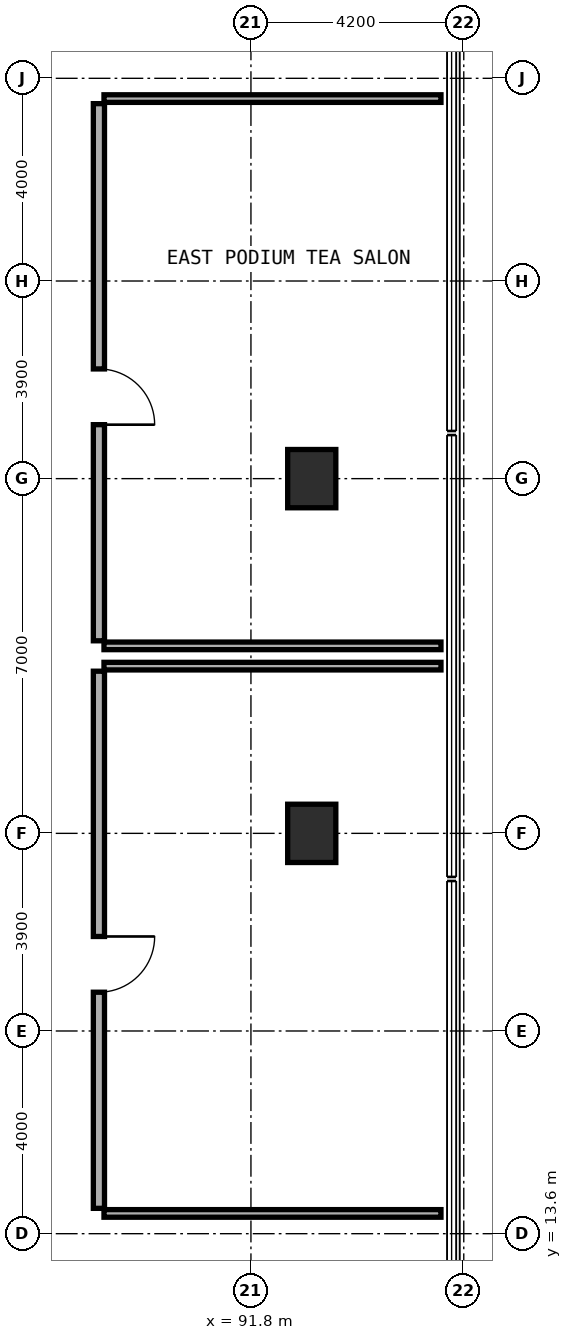
"""IFC4 building model, lengths in metres.
Left out: names, types, materials, properties, quantities, classifications, styles, units other than length and angle.
Written with IfcOpenShell. Run it as: python <this file> out.ifc"""

import sys

from ifc_helpers import new_model, si_unit, direction, frame, frame_2d, origin, origin_2d, place, context, subcontext, project, spatial, rectangle, extrude, element, fill, save


model = new_model("IFC4")
c1 = context("Model", 3, precision=1e-05, world=origin(), true_north=direction((0.0, 1.0)))
c2 = subcontext(c1, "Body", "Model", "MODEL_VIEW")
j1 = project(units=[si_unit("LENGTHUNIT", "METRE"), si_unit("PLANEANGLEUNIT", "RADIAN")], contexts=[c1])
p1 = place(None, origin())
s1 = spatial("IfcSite", under=j1, at=p1, CompositionType="ELEMENT")
p2 = place(p1, origin())
s2 = spatial("IfcBuilding", under=s1, at=p2, CompositionType="ELEMENT")
p3 = place(p2, frame((0.0, 0.0, 10.2)))
s3 = spatial("IfcBuildingStorey", under=s2, at=p3, CompositionType="ELEMENT", Elevation=10.2)
for number, where, z_axis, x_axis in (
    (1, (93.0, 21.5, 0.0), (0.0, 0.0, 1.0), (1.0, 0.0, 0.0)),
    (2, (93.0, 28.5, 0.0), (0.0, 0.0, 1.0), (1.0, 0.0, 0.0)),
):
    element("IfcColumn", number, at=place(p3, frame(where, z_axis=z_axis, x_axis=x_axis)), inside=s3, PredefinedType="COLUMN", context=c2, shape_type="SweptSolid", body=[
        extrude(rectangle(XDim=0.95, YDim=1.15, at=origin_2d()), origin(), (0.0, 0.0, 1.0), 4.8),
    ])
for number, where, z_axis, x_axis in (
    (3, (88.9, 14.0, 0.0), (0.0, 0.0, 1.0), (1.0, 0.0, 0.0)),
    (4, (88.9, 24.8, 0.0), (0.0, 0.0, 1.0), (1.0, 0.0, 0.0)),
):
    element("IfcWall", number, at=place(p3, frame(where, z_axis=z_axis, x_axis=x_axis)), inside=s3, PredefinedType="PARTITIONING", context=c2, shape_type="SweptSolid", body=[
        extrude(rectangle(XDim=6.65, YDim=0.15, at=frame_2d((3.325, 0.0))), origin(), (0.0, 0.0, 1.0), 4.065),
    ])
p4 = place(p3, frame((88.8, 14.1, 0.0), z_axis=(0.0, 0.0, 1.0), x_axis=(0.0, 1.0, 0.0)))
e5 = element("IfcWall", 5, at=p4, inside=s3, PredefinedType="SOLIDWALL", context=c2, shape_type="SweptSolid", body=[
    extrude(rectangle(XDim=10.6, YDim=0.22, at=frame_2d((5.3, 0.0))), origin(), (0.0, 0.0, 1.0), 3.925),
])
p5 = place(p4, frame((4.265, 0.0, 0.0)))
e6 = element("IfcOpeningElement", 6, at=p5, cuts=e5, PredefinedType="OPENING", context=c2, shape_type="SweptSolid", body=[
    extrude(rectangle(XDim=1.1, YDim=2.1, at=frame_2d((0.55, 1.05))), frame((0.0, 0.12, 0.0), z_axis=(0.0, -1.0, 0.0), x_axis=(1.0, 0.0, 0.0)), (0.0, 0.0, 1.0), 0.24),
])
for number, where, z_axis, x_axis in (
    (7, (88.9, 25.2, 0.0), (0.0, 0.0, 1.0), (1.0, 0.0, 0.0)),
    (8, (88.9, 36.0, 0.0), (0.0, 0.0, 1.0), (1.0, 0.0, 0.0)),
):
    element("IfcWall", number, at=place(p3, frame(where, z_axis=z_axis, x_axis=x_axis)), inside=s3, PredefinedType="PARTITIONING", context=c2, shape_type="SweptSolid", body=[
        extrude(rectangle(XDim=6.65, YDim=0.15, at=frame_2d((3.325, 0.0))), origin(), (0.0, 0.0, 1.0), 4.065),
    ])
p6 = place(p3, frame((88.8, 25.3, 0.0), z_axis=(0.0, 0.0, 1.0), x_axis=(0.0, 1.0, 0.0)))
e9 = element("IfcWall", 9, at=p6, inside=s3, PredefinedType="SOLIDWALL", context=c2, shape_type="SweptSolid", body=[
    extrude(rectangle(XDim=10.6, YDim=0.22, at=frame_2d((5.3, 0.0))), origin(), (0.0, 0.0, 1.0), 3.925),
])
p7 = place(p6, frame((4.265, 0.0, 0.0)))
e10 = element("IfcOpeningElement", 10, at=p7, cuts=e9, PredefinedType="OPENING", context=c2, shape_type="SweptSolid", body=[
    extrude(rectangle(XDim=1.1, YDim=2.1, at=frame_2d((0.55, 1.05))), frame((0.0, 0.12, 0.0), z_axis=(0.0, -1.0, 0.0), x_axis=(1.0, 0.0, 0.0)), (0.0, 0.0, 1.0), 0.24),
])
p8 = place(p5, frame((1.1, 0.0, 0.0), z_axis=(0.0, 0.0, 1.0), x_axis=(-1.0, 0.0, 0.0)))
e11 = element("IfcDoor", 11, at=p8, inside=s3, OperationType="SINGLE_SWING_LEFT", PredefinedType="DOOR", context=c2, shape_type="SweptSolid", body=[
    extrude(rectangle(XDim=1.1, YDim=2.1, at=frame_2d((0.55, 1.05))), frame((0.0, 0.025, 0.0), z_axis=(0.0, -1.0, 0.0), x_axis=(1.0, 0.0, 0.0)), (0.0, 0.0, 1.0), 0.05),
])
fill(e6, e11)
p9 = place(p7, frame((1.1, 0.0, 0.0), z_axis=(0.0, 0.0, 1.0), x_axis=(-1.0, 0.0, 0.0)))
e12 = element("IfcDoor", 12, at=p9, inside=s3, OperationType="SINGLE_SWING_RIGHT", PredefinedType="DOOR", context=c2, shape_type="SweptSolid", body=[
    extrude(rectangle(XDim=1.1, YDim=2.1, at=frame_2d((0.55, 1.05))), frame((0.0, 0.025, 0.0), z_axis=(0.0, -1.0, 0.0), x_axis=(1.0, 0.0, 0.0)), (0.0, 0.0, 1.0), 0.05),
])
fill(e10, e12)
save(model, sys.argv[1])
